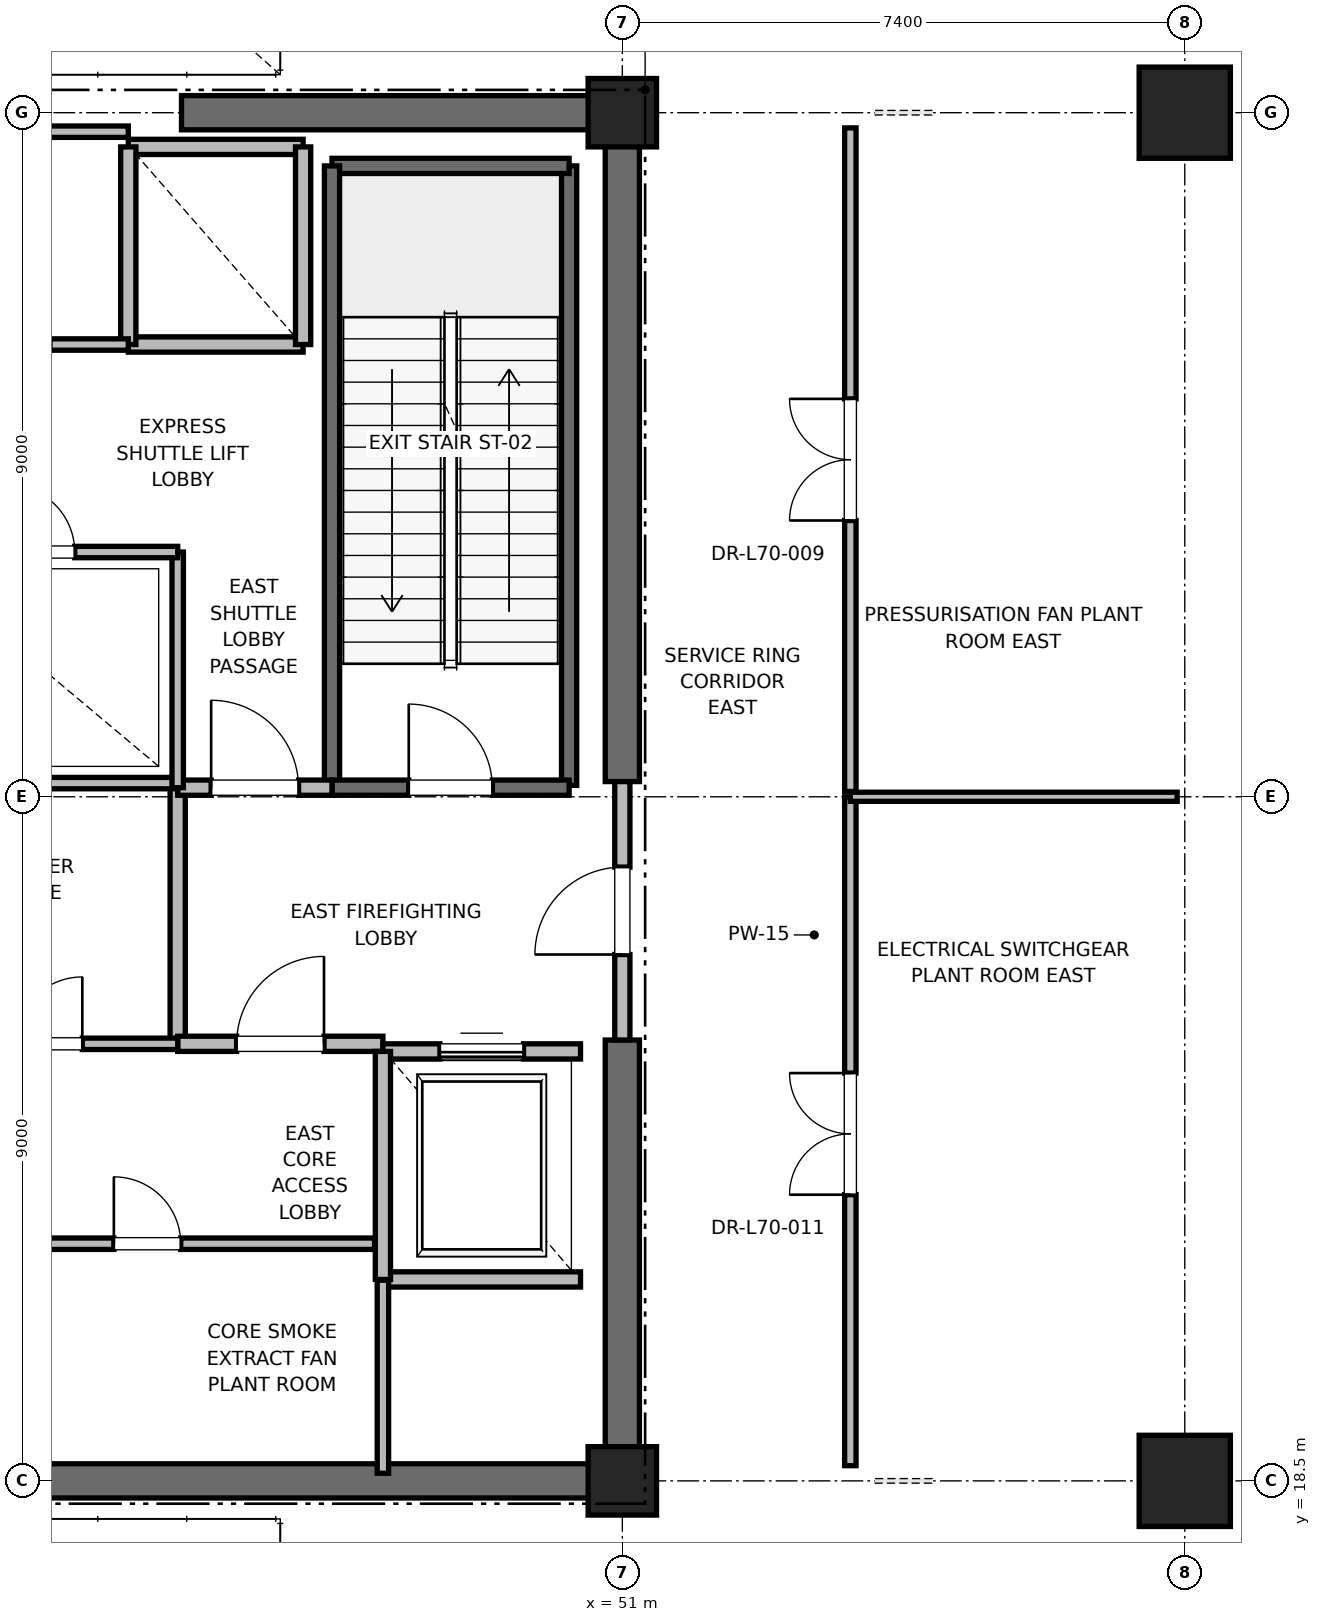
"""IFC4 building model, lengths in metres.
Left out: names, types, materials, properties, quantities, classifications, styles, units other than length and angle.
Written with IfcOpenShell. Run it as: python <this file> out.ifc"""

import sys

from ifc_helpers import new_model, si_unit, direction, frame, frame_2d, origin, origin_2d, place, context, subcontext, project, spatial, rectangle, extrude, element, fill, save


model = new_model("IFC4")
c1 = context("Model", 3, precision=1e-05, world=origin(), true_north=direction((0.0, 1.0)))
c2 = subcontext(c1, "Body", "Model", "MODEL_VIEW")
j1 = project(units=[si_unit("LENGTHUNIT", "METRE"), si_unit("PLANEANGLEUNIT", "RADIAN")], contexts=[c1])
p1 = place(None, origin())
s1 = spatial("IfcSite", under=j1, at=p1, CompositionType="ELEMENT")
p2 = place(p1, origin())
s2 = spatial("IfcBuilding", under=s1, at=p2, CompositionType="ELEMENT")
p3 = place(p2, frame((0.0, 0.0, 301.0)))
s3 = spatial("IfcBuildingStorey", under=s2, at=p3, CompositionType="ELEMENT", Elevation=301.0)
for number, where, z_axis, x_axis in (
    (1, (58.4, 18.5, 0.0), (0.0, 0.0, 1.0), (1.0, 0.0, 0.0)),
    (2, (58.4, 36.5, 0.0), (0.0, 0.0, 1.0), (1.0, 0.0, 0.0)),
):
    element("IfcColumn", number, at=place(p3, frame(where, z_axis=z_axis, x_axis=x_axis)), inside=s3, PredefinedType="COLUMN", context=c2, shape_type="SweptSolid", body=[
        extrude(rectangle(XDim=1.2, YDim=1.2, at=origin_2d()), origin(), (0.0, 0.0, 1.0), 5.8),
    ])
for number, where, z_axis, x_axis in (
    (3, (51.0, 18.5, 0.0), (0.0, 0.0, 1.0), (1.0, 0.0, 0.0)),
    (4, (51.0, 36.5, 0.0), (0.0, 0.0, 1.0), (1.0, 0.0, 0.0)),
):
    element("IfcColumn", number, at=place(p3, frame(where, z_axis=z_axis, x_axis=x_axis)), inside=s3, PredefinedType="PILASTER", context=c2, shape_type="SweptSolid", body=[
        extrude(rectangle(XDim=0.9, YDim=0.9, at=origin_2d()), origin(), (0.0, 0.0, 1.0), 5.8),
    ])
p4 = place(p3, frame((41.8, 18.5, 0.0), z_axis=(0.0, 0.0, 1.0), x_axis=(1.0, 0.0, 0.0)))
e5 = element("IfcWall", 5, at=p4, inside=s3, PredefinedType="SHEAR", context=c2, shape_type="SweptSolid", body=[
    extrude(rectangle(XDim=9.2, YDim=0.45, at=frame_2d((4.6, 0.0))), origin(), (0.0, 0.0, 1.0), 5.585),
])
for number, where, z_axis, x_axis in (
    (6, (45.2, 36.5, 0.0), (0.0, 0.0, 1.0), (1.0, 0.0, 0.0)),
    (7, (51.0, 18.5, 0.0), (0.0, 0.0, 1.0), (0.0, 1.0, 0.0)),
):
    element("IfcWall", number, at=place(p3, frame(where, z_axis=z_axis, x_axis=x_axis)), inside=s3, PredefinedType="SHEAR", context=c2, shape_type="SweptSolid", body=[
        extrude(rectangle(XDim=5.8, YDim=0.45, at=frame_2d((2.9, 0.0))), origin(), (0.0, 0.0, 1.0), 5.585),
    ])
p5 = place(p3, frame((51.0, 27.7, 0.0), z_axis=(0.0, 0.0, 1.0), x_axis=(0.0, 1.0, 0.0)))
e8 = element("IfcWall", 8, at=p5, inside=s3, PredefinedType="SHEAR", context=c2, shape_type="SweptSolid", body=[
    extrude(rectangle(XDim=8.8, YDim=0.45, at=frame_2d((4.4, 0.0))), origin(), (0.0, 0.0, 1.0), 5.585),
])
p6 = place(p3, frame((50.3, 27.65, 0.0), z_axis=(0.0, 0.0, 1.0), x_axis=(0.0, 1.0, 0.0)))
e9 = element("IfcWall", 9, at=p6, inside=s3, PredefinedType="SOLIDWALL", context=c2, shape_type="SweptSolid", body=[
    extrude(rectangle(XDim=8.15, YDim=0.2, at=frame_2d((4.075, 0.0))), origin(), (0.0, 0.0, 1.0), 5.585),
])
p7 = place(p3, frame((47.18, 35.8, 0.0), z_axis=(0.0, 0.0, 1.0), x_axis=(1.0, 0.0, 0.0)))
e10 = element("IfcWall", 10, at=p7, inside=s3, PredefinedType="SOLIDWALL", context=c2, shape_type="SweptSolid", body=[
    extrude(rectangle(XDim=3.12, YDim=0.2, at=frame_2d((1.56, 0.0))), origin(), (0.0, 0.0, 1.0), 5.585),
])
p8 = place(p3, frame((47.18, 27.62, 0.0), z_axis=(0.0, 0.0, 1.0), x_axis=(0.0, 1.0, 0.0)))
e11 = element("IfcWall", 11, at=p8, inside=s3, PredefinedType="SOLIDWALL", context=c2, shape_type="SweptSolid", body=[
    extrude(rectangle(XDim=8.18, YDim=0.2, at=frame_2d((4.09, 0.0))), origin(), (0.0, 0.0, 1.0), 5.585),
])
p9 = place(p3, frame((47.18, 27.62, 0.0), z_axis=(0.0, 0.0, 1.0), x_axis=(1.0, 0.0, 0.0)))
e12 = element("IfcWall", 12, at=p9, inside=s3, PredefinedType="SOLIDWALL", context=c2, shape_type="SweptSolid", body=[
    extrude(rectangle(XDim=3.12, YDim=0.2, at=frame_2d((1.56, 0.0))), origin(), (0.0, 0.0, 1.0), 5.585),
])
p10 = place(p9, frame((1.01, 0.0, 0.0)))
e13 = element("IfcOpeningElement", 13, at=p10, cuts=e12, PredefinedType="OPENING", context=c2, shape_type="SweptSolid", body=[
    extrude(rectangle(XDim=1.1, YDim=2.15, at=frame_2d((0.55, 1.075))), frame((0.0, 0.1, 0.0), z_axis=(0.0, -1.0, 0.0), x_axis=(1.0, 0.0, 0.0)), (0.0, 0.0, 1.0), 0.2),
])
p11 = place(p3, frame((45.15, 24.25, 0.0), z_axis=(0.0, 0.0, 1.0), x_axis=(0.0, 1.0, 0.0)))
e14 = element("IfcWall", 14, at=p11, inside=s3, PredefinedType="PARTITIONING", context=c2, shape_type="SweptSolid", body=[
    extrude(rectangle(XDim=3.37, YDim=0.2, at=frame_2d((1.685, 0.0))), origin(), (0.0, 0.0, 1.0), 5.585),
])
p12 = place(p3, frame((45.15, 24.25, 0.0), z_axis=(0.0, 0.0, 1.0), x_axis=(1.0, 0.0, 0.0)))
e15 = element("IfcWall", 15, at=p12, inside=s3, PredefinedType="PARTITIONING", context=c2, shape_type="SweptSolid", body=[
    extrude(rectangle(XDim=2.7, YDim=0.2, at=frame_2d((1.35, 0.0))), origin(), (0.0, 0.0, 1.0), 5.585),
])
p13 = place(p12, frame((0.775, 0.0, 0.0)))
e16 = element("IfcOpeningElement", 16, at=p13, cuts=e15, PredefinedType="OPENING", context=c2, shape_type="SweptSolid", body=[
    extrude(rectangle(XDim=1.15, YDim=2.2, at=frame_2d((0.575, 1.1))), frame((0.0, 0.1, 0.0), z_axis=(0.0, -1.0, 0.0), x_axis=(1.0, 0.0, 0.0)), (0.0, 0.0, 1.0), 0.2),
])
p14 = place(p3, frame((45.15, 27.62, 0.0), z_axis=(0.0, 0.0, 1.0), x_axis=(1.0, 0.0, 0.0)))
e17 = element("IfcWall", 17, at=p14, inside=s3, PredefinedType="PARTITIONING", context=c2, shape_type="SweptSolid", body=[
    extrude(rectangle(XDim=2.03, YDim=0.2, at=frame_2d((1.015, 0.0))), origin(), (0.0, 0.0, 1.0), 5.585),
])
p15 = place(p14, frame((0.44, 0.0, 0.0)))
e18 = element("IfcOpeningElement", 18, at=p15, cuts=e17, PredefinedType="OPENING", context=c2, shape_type="SweptSolid", body=[
    extrude(rectangle(XDim=1.15, YDim=2.2, at=frame_2d((0.575, 1.1))), frame((0.0, 0.1, 0.0), z_axis=(0.0, -1.0, 0.0), x_axis=(1.0, 0.0, 0.0)), (0.0, 0.0, 1.0), 0.2),
])
p16 = place(p3, frame((51.0, 24.3, 0.0), z_axis=(0.0, 0.0, 1.0), x_axis=(0.0, 1.0, 0.0)))
e19 = element("IfcWall", 19, at=p16, inside=s3, PredefinedType="PARTITIONING", context=c2, shape_type="SweptSolid", body=[
    extrude(rectangle(XDim=3.4, YDim=0.2, at=frame_2d((1.7, 0.0))), origin(), (0.0, 0.0, 1.0), 4.665),
])
p17 = place(p16, frame((1.125, 0.0, 0.0)))
e20 = element("IfcOpeningElement", 20, at=p17, cuts=e19, PredefinedType="OPENING", context=c2, shape_type="SweptSolid", body=[
    extrude(rectangle(XDim=1.15, YDim=2.2, at=frame_2d((0.575, 1.1))), frame((0.0, 0.1, 0.0), z_axis=(0.0, -1.0, 0.0), x_axis=(1.0, 0.0, 0.0)), (0.0, 0.0, 1.0), 0.2),
])
p18 = place(p3, frame((47.85, 21.15, 0.0), z_axis=(0.0, 0.0, 1.0), x_axis=(1.0, 0.0, 0.0)))
e21 = element("IfcWall", 21, at=p18, inside=s3, PredefinedType="SOLIDWALL", context=c2, shape_type="SweptSolid", body=[
    extrude(rectangle(XDim=2.6, YDim=0.2, at=frame_2d((1.3, 0.0))), origin(), (0.0, 0.0, 1.0), 5.585),
])
p19 = place(p3, frame((50.45, 24.15, 0.0), z_axis=(0.0, 0.0, 1.0), x_axis=(-1.0, 0.0, 0.0)))
e22 = element("IfcWall", 22, at=p19, inside=s3, PredefinedType="SOLIDWALL", context=c2, shape_type="SweptSolid", body=[
    extrude(rectangle(XDim=2.6, YDim=0.2, at=frame_2d((1.3, 0.0))), origin(), (0.0, 0.0, 1.0), 4.665),
])
p20 = place(p19, frame((0.75, 0.0, 0.0)))
e23 = element("IfcOpeningElement", 23, at=p20, cuts=e22, PredefinedType="OPENING", context=c2, shape_type="SweptSolid", body=[
    extrude(rectangle(XDim=1.1, YDim=2.2, at=frame_2d((0.55, 1.1))), frame((0.0, 0.1, 0.0), z_axis=(0.0, -1.0, 0.0), x_axis=(1.0, 0.0, 0.0)), (0.0, 0.0, 1.0), 0.2),
])
p21 = place(p3, frame((47.85, 24.15, 0.0), z_axis=(0.0, 0.0, 1.0), x_axis=(0.0, -1.0, 0.0)))
e24 = element("IfcWall", 24, at=p21, inside=s3, PredefinedType="SOLIDWALL", context=c2, shape_type="SweptSolid", body=[
    extrude(rectangle(XDim=3.0, YDim=0.2, at=frame_2d((1.5, 0.0))), origin(), (0.0, 0.0, 1.0), 5.585),
])
p22 = place(p3, frame((44.5, 33.45, 0.0), z_axis=(0.0, 0.0, 1.0), x_axis=(1.0, 0.0, 0.0)))
e25 = element("IfcWall", 25, at=p22, inside=s3, PredefinedType="SOLIDWALL", context=c2, shape_type="SweptSolid", body=[
    extrude(rectangle(XDim=2.3, YDim=0.2, at=frame_2d((1.15, 0.0))), origin(), (0.0, 0.0, 1.0), 5.585),
])
p23 = place(p3, frame((46.8, 36.05, 0.0), z_axis=(0.0, 0.0, 1.0), x_axis=(-1.0, 0.0, 0.0)))
e26 = element("IfcWall", 26, at=p23, inside=s3, PredefinedType="SOLIDWALL", context=c2, shape_type="SweptSolid", body=[
    extrude(rectangle(XDim=2.3, YDim=0.2, at=frame_2d((1.15, 0.0))), origin(), (0.0, 0.0, 1.0), 4.665),
])
p24 = place(p3, frame((44.5, 36.05, 0.0), z_axis=(0.0, 0.0, 1.0), x_axis=(0.0, -1.0, 0.0)))
e27 = element("IfcWall", 27, at=p24, inside=s3, PredefinedType="SOLIDWALL", context=c2, shape_type="SweptSolid", body=[
    extrude(rectangle(XDim=2.6, YDim=0.2, at=frame_2d((1.3, 0.0))), origin(), (0.0, 0.0, 1.0), 4.665),
])
p25 = place(p3, frame((46.8, 33.45, 0.0), z_axis=(0.0, 0.0, 1.0), x_axis=(0.0, 1.0, 0.0)))
e28 = element("IfcWall", 28, at=p25, inside=s3, PredefinedType="SOLIDWALL", context=c2, shape_type="SweptSolid", body=[
    extrude(rectangle(XDim=2.6, YDim=0.2, at=frame_2d((1.3, 0.0))), origin(), (0.0, 0.0, 1.0), 5.585),
])
p26 = place(p3, frame((41.56, 27.68, 0.0), z_axis=(0.0, 0.0, 1.0), x_axis=(1.0, 0.0, 0.0)))
e29 = element("IfcWall", 29, at=p26, inside=s3, PredefinedType="PARTITIONING", context=c2, shape_type="SweptSolid", body=[
    extrude(rectangle(XDim=3.59, YDim=0.15, at=frame_2d((1.795, 0.0))), origin(), (0.0, 0.0, 1.0), 2.85),
])
p27 = place(p3, frame((47.85, 18.6, 0.0), z_axis=(0.0, 0.0, 1.0), x_axis=(0.0, 1.0, 0.0)))
e30 = element("IfcWall", 30, at=p27, inside=s3, PredefinedType="PARTITIONING", context=c2, shape_type="SweptSolid", body=[
    extrude(rectangle(XDim=2.54, YDim=0.15, at=frame_2d((1.27, 0.0))), origin(), (0.0, 0.0, 1.0), 2.85),
])
p28 = place(p3, frame((41.76, 21.62, 0.0), z_axis=(0.0, 0.0, 1.0), x_axis=(1.0, 0.0, 0.0)))
e31 = element("IfcWall", 31, at=p28, inside=s3, PredefinedType="PARTITIONING", context=c2, shape_type="SweptSolid", body=[
    extrude(rectangle(XDim=5.98, YDim=0.15, at=frame_2d((2.99, 0.0))), origin(), (0.0, 0.0, 1.0), 2.85),
])
p29 = place(p28, frame((2.55, 0.0, 0.0)))
e32 = element("IfcOpeningElement", 32, at=p29, cuts=e31, PredefinedType="OPENING", context=c2, shape_type="SweptSolid", body=[
    extrude(rectangle(XDim=0.88, YDim=2.1, at=frame_2d((0.44, 1.05))), frame((0.0, 0.075, 0.0), z_axis=(0.0, -1.0, 0.0), x_axis=(1.0, 0.0, 0.0)), (0.0, 0.0, 1.0), 0.15),
])
p30 = place(p3, frame((41.76, 24.25, 0.0), z_axis=(0.0, 0.0, 1.0), x_axis=(1.0, 0.0, 0.0)))
e33 = element("IfcWall", 33, at=p30, inside=s3, PredefinedType="PARTITIONING", context=c2, shape_type="SweptSolid", body=[
    extrude(rectangle(XDim=3.39, YDim=0.15, at=frame_2d((1.695, 0.0))), origin(), (0.0, 0.0, 1.0), 2.85),
])
p31 = place(p30, frame((1.255, 0.0, 0.0)))
e34 = element("IfcOpeningElement", 34, at=p31, cuts=e33, PredefinedType="OPENING", context=c2, shape_type="SweptSolid", body=[
    extrude(rectangle(XDim=0.88, YDim=2.1, at=frame_2d((0.44, 1.05))), frame((0.0, 0.075, 0.0), z_axis=(0.0, -1.0, 0.0), x_axis=(1.0, 0.0, 0.0)), (0.0, 0.0, 1.0), 0.15),
])
p32 = place(p3, frame((45.15, 27.62, 0.0), z_axis=(0.0, 0.0, 1.0), x_axis=(0.0, 1.0, 0.0)))
e35 = element("IfcWall", 35, at=p32, inside=s3, PredefinedType="PARTITIONING", context=c2, shape_type="SweptSolid", body=[
    extrude(rectangle(XDim=3.1, YDim=0.15, at=frame_2d((1.55, 0.0))), origin(), (0.0, 0.0, 1.0), 2.85),
])
p33 = place(p3, frame((41.56, 30.72, 0.0), z_axis=(0.0, 0.0, 1.0), x_axis=(1.0, 0.0, 0.0)))
e36 = element("IfcWall", 36, at=p33, inside=s3, PredefinedType="PARTITIONING", context=c2, shape_type="SweptSolid", body=[
    extrude(rectangle(XDim=3.59, YDim=0.15, at=frame_2d((1.795, 0.0))), origin(), (0.0, 0.0, 1.0), 2.85),
])
p34 = place(p33, frame((1.355, 0.0, 0.0)))
e37 = element("IfcOpeningElement", 37, at=p34, cuts=e36, PredefinedType="OPENING", context=c2, shape_type="SweptSolid", body=[
    extrude(rectangle(XDim=0.88, YDim=2.1, at=frame_2d((0.44, 1.05))), frame((0.0, 0.075, 0.0), z_axis=(0.0, -1.0, 0.0), x_axis=(1.0, 0.0, 0.0)), (0.0, 0.0, 1.0), 0.15),
])
p35 = place(p3, frame((41.56, 36.25, 0.0), z_axis=(0.0, 0.0, 1.0), x_axis=(1.0, 0.0, 0.0)))
e38 = element("IfcWall", 38, at=p35, inside=s3, PredefinedType="PARTITIONING", context=c2, shape_type="SweptSolid", body=[
    extrude(rectangle(XDim=2.94, YDim=0.15, at=frame_2d((1.47, 0.0))), origin(), (0.0, 0.0, 1.0), 2.85),
])
p36 = place(p3, frame((41.56, 33.45, 0.0), z_axis=(0.0, 0.0, 1.0), x_axis=(1.0, 0.0, 0.0)))
e39 = element("IfcWall", 39, at=p36, inside=s3, PredefinedType="PARTITIONING", context=c2, shape_type="SweptSolid", body=[
    extrude(rectangle(XDim=2.94, YDim=0.15, at=frame_2d((1.47, 0.0))), origin(), (0.0, 0.0, 1.0), 2.85),
])
p37 = place(p36, frame((1.03, 0.0, 0.0)))
e40 = element("IfcOpeningElement", 40, at=p37, cuts=e39, PredefinedType="OPENING", context=c2, shape_type="SweptSolid", body=[
    extrude(rectangle(XDim=0.88, YDim=2.1, at=frame_2d((0.44, 1.05))), frame((0.0, 0.075, 0.0), z_axis=(0.0, -1.0, 0.0), x_axis=(1.0, 0.0, 0.0)), (0.0, 0.0, 1.0), 0.15),
])
p38 = place(p3, frame((54.0, 18.7, 0.0), z_axis=(0.0, 0.0, 1.0), x_axis=(0.0, 1.0, 0.0)))
e41 = element("IfcWall", 41, at=p38, inside=s3, PredefinedType="PARTITIONING", context=c2, shape_type="SweptSolid", body=[
    extrude(rectangle(XDim=8.8, YDim=0.15, at=frame_2d((4.4, 0.0))), origin(), (0.0, 0.0, 1.0), 2.85),
])
p39 = place(p38, frame((3.565, 0.0, 0.0)))
e42 = element("IfcOpeningElement", 42, at=p39, cuts=e41, PredefinedType="OPENING", context=c2, shape_type="SweptSolid", body=[
    extrude(rectangle(XDim=1.6, YDim=2.25, at=frame_2d((0.8, 1.125))), frame((0.0, 0.075, 0.0), z_axis=(0.0, -1.0, 0.0), x_axis=(1.0, 0.0, 0.0)), (0.0, 0.0, 1.0), 0.15),
])
p40 = place(p3, frame((54.0, 27.5, 0.0), z_axis=(0.0, 0.0, 1.0), x_axis=(1.0, 0.0, 0.0)))
e43 = element("IfcWall", 43, at=p40, inside=s3, PredefinedType="PARTITIONING", context=c2, shape_type="SweptSolid", body=[
    extrude(rectangle(XDim=4.3, YDim=0.12, at=frame_2d((2.15, 0.0))), origin(), (0.0, 0.0, 1.0), 2.85),
])
p41 = place(p3, frame((54.0, 27.57, 0.0), z_axis=(0.0, 0.0, 1.0), x_axis=(0.0, 1.0, 0.0)))
e44 = element("IfcWall", 44, at=p41, inside=s3, PredefinedType="PARTITIONING", context=c2, shape_type="SweptSolid", body=[
    extrude(rectangle(XDim=8.73, YDim=0.15, at=frame_2d((4.365, 0.0))), origin(), (0.0, 0.0, 1.0), 2.85),
])
p42 = place(p41, frame((3.565, 0.0, 0.0)))
e45 = element("IfcOpeningElement", 45, at=p42, cuts=e44, PredefinedType="OPENING", context=c2, shape_type="SweptSolid", body=[
    extrude(rectangle(XDim=1.6, YDim=2.25, at=frame_2d((0.8, 1.125))), frame((0.0, 0.075, 0.0), z_axis=(0.0, -1.0, 0.0), x_axis=(1.0, 0.0, 0.0)), (0.0, 0.0, 1.0), 0.15),
])
p43 = place(p10, origin())
e46 = element("IfcDoor", 46, at=p43, inside=s3, OperationType="SINGLE_SWING_LEFT", PredefinedType="DOOR", context=c2, shape_type="SweptSolid", body=[
    extrude(rectangle(XDim=1.1, YDim=2.15, at=frame_2d((0.55, 1.075))), frame((0.0, 0.025, 0.0), z_axis=(0.0, -1.0, 0.0), x_axis=(1.0, 0.0, 0.0)), (0.0, 0.0, 1.0), 0.05),
])
fill(e13, e46)
p44 = place(p13, origin())
e47 = element("IfcDoor", 47, at=p44, inside=s3, OperationType="SINGLE_SWING_RIGHT", PredefinedType="DOOR", context=c2, shape_type="SweptSolid", body=[
    extrude(rectangle(XDim=1.15, YDim=2.2, at=frame_2d((0.575, 1.1))), frame((0.0, 0.025, 0.0), z_axis=(0.0, -1.0, 0.0), x_axis=(1.0, 0.0, 0.0)), (0.0, 0.0, 1.0), 0.05),
])
fill(e16, e47)
p45 = place(p15, origin())
e48 = element("IfcDoor", 48, at=p45, inside=s3, OperationType="SINGLE_SWING_LEFT", PredefinedType="DOOR", context=c2, shape_type="SweptSolid", body=[
    extrude(rectangle(XDim=1.15, YDim=2.2, at=frame_2d((0.575, 1.1))), frame((0.0, 0.025, 0.0), z_axis=(0.0, -1.0, 0.0), x_axis=(1.0, 0.0, 0.0)), (0.0, 0.0, 1.0), 0.05),
])
fill(e18, e48)
p46 = place(p17, origin())
e49 = element("IfcDoor", 49, at=p46, inside=s3, OperationType="SINGLE_SWING_LEFT", PredefinedType="DOOR", context=c2, shape_type="SweptSolid", body=[
    extrude(rectangle(XDim=1.15, YDim=2.2, at=frame_2d((0.575, 1.1))), frame((0.0, 0.025, 0.0), z_axis=(0.0, -1.0, 0.0), x_axis=(1.0, 0.0, 0.0)), (0.0, 0.0, 1.0), 0.05),
])
fill(e20, e49)
p47 = place(p20, origin())
e50 = element("IfcDoor", 50, at=p47, inside=s3, OperationType="SLIDING_TO_RIGHT", PredefinedType="DOOR", context=c2, shape_type="SweptSolid", body=[
    extrude(rectangle(XDim=1.1, YDim=2.2, at=frame_2d((0.55, 1.1))), frame((0.0, 0.025, 0.0), z_axis=(0.0, -1.0, 0.0), x_axis=(1.0, 0.0, 0.0)), (0.0, 0.0, 1.0), 0.05),
])
fill(e23, e50)
p48 = place(p29, origin())
e51 = element("IfcDoor", 51, at=p48, inside=s3, OperationType="SINGLE_SWING_LEFT", PredefinedType="DOOR", context=c2, shape_type="SweptSolid", body=[
    extrude(rectangle(XDim=0.88, YDim=2.1, at=frame_2d((0.44, 1.05))), frame((0.0, 0.025, 0.0), z_axis=(0.0, -1.0, 0.0), x_axis=(1.0, 0.0, 0.0)), (0.0, 0.0, 1.0), 0.05),
])
fill(e32, e51)
p49 = place(p31, origin())
e52 = element("IfcDoor", 52, at=p49, inside=s3, OperationType="SINGLE_SWING_RIGHT", PredefinedType="DOOR", context=c2, shape_type="SweptSolid", body=[
    extrude(rectangle(XDim=0.88, YDim=2.1, at=frame_2d((0.44, 1.05))), frame((0.0, 0.025, 0.0), z_axis=(0.0, -1.0, 0.0), x_axis=(1.0, 0.0, 0.0)), (0.0, 0.0, 1.0), 0.05),
])
fill(e34, e52)
p50 = place(p34, origin())
e53 = element("IfcDoor", 53, at=p50, inside=s3, OperationType="SINGLE_SWING_LEFT", PredefinedType="DOOR", context=c2, shape_type="SweptSolid", body=[
    extrude(rectangle(XDim=0.88, YDim=2.1, at=frame_2d((0.44, 1.05))), frame((0.0, 0.025, 0.0), z_axis=(0.0, -1.0, 0.0), x_axis=(1.0, 0.0, 0.0)), (0.0, 0.0, 1.0), 0.05),
])
fill(e37, e53)
p51 = place(p39, origin())
e54 = element("IfcDoor", 54, at=p51, inside=s3, OperationType="DOUBLE_DOOR_SINGLE_SWING", PredefinedType="DOOR", context=c2, shape_type="SweptSolid", body=[
    extrude(rectangle(XDim=1.6, YDim=2.25, at=frame_2d((0.8, 1.125))), frame((0.0, 0.025, 0.0), z_axis=(0.0, -1.0, 0.0), x_axis=(1.0, 0.0, 0.0)), (0.0, 0.0, 1.0), 0.05),
])
fill(e42, e54)
p52 = place(p42, origin())
e55 = element("IfcDoor", 55, at=p52, inside=s3, OperationType="DOUBLE_DOOR_SINGLE_SWING", PredefinedType="DOOR", context=c2, shape_type="SweptSolid", body=[
    extrude(rectangle(XDim=1.6, YDim=2.25, at=frame_2d((0.8, 1.125))), frame((0.0, 0.025, 0.0), z_axis=(0.0, -1.0, 0.0), x_axis=(1.0, 0.0, 0.0)), (0.0, 0.0, 1.0), 0.05),
])
fill(e45, e55)
save(model, sys.argv[1])
